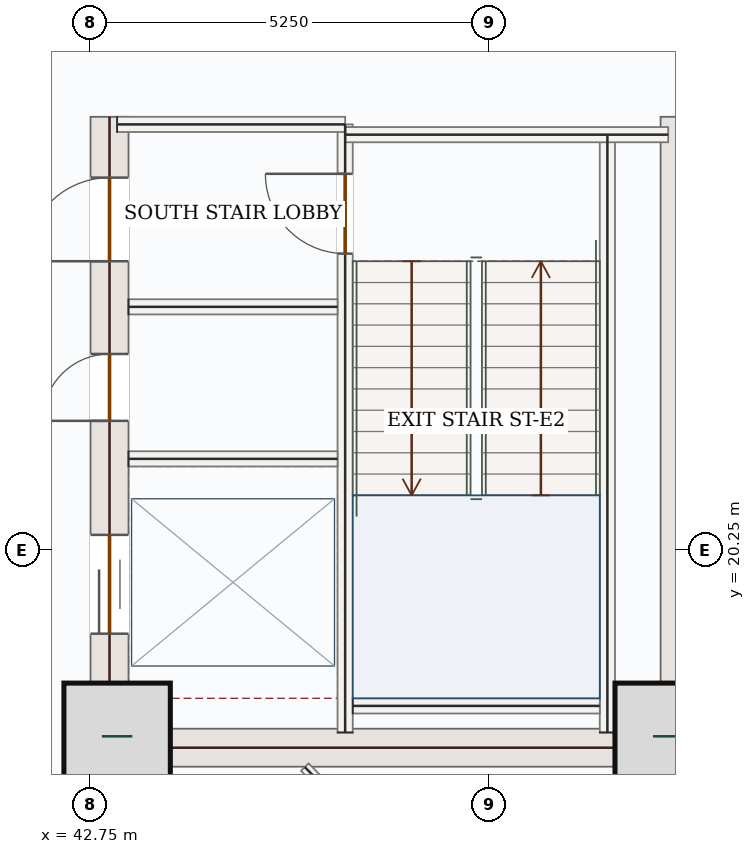
"""IFC4 building model, lengths in metres.
Left out: names, types, materials, properties, quantities, classifications, styles, units other than length and angle.
Written with IfcOpenShell. Run it as: python <this file> out.ifc"""

import sys

from ifc_helpers import new_model, si_unit, direction, frame, frame_2d, origin, origin_2d, place, context, subcontext, project, spatial, rectangle, extrude, source, transform, mapped, element, fill, save


model = new_model("IFC4")
c1 = context("Model", 3, precision=1e-05, world=origin(), true_north=direction((0.0, 1.0)))
c2 = subcontext(c1, "Body", "Model", "MODEL_VIEW")
j1 = project(units=[si_unit("LENGTHUNIT", "METRE"), si_unit("PLANEANGLEUNIT", "RADIAN")], contexts=[c1])
p1 = place(None, origin())
s1 = spatial("IfcSite", under=j1, at=p1, CompositionType="ELEMENT")
p2 = place(p1, origin())
s2 = spatial("IfcBuilding", under=s1, at=p2, CompositionType="ELEMENT")
p3 = place(p2, frame((0.0, 0.0, 37.5)))
s3 = spatial("IfcBuildingStorey", under=s2, at=p3, CompositionType="ELEMENT", Elevation=37.5)
p4 = place(p3, frame((43.0, 17.4, 0.0), z_axis=(0.0, 0.0, 1.0), x_axis=(0.0, 1.0, 0.0)))
e1 = element("IfcWall", 1, at=p4, inside=s3, PredefinedType="SHEAR", context=c2, shape_type="SweptSolid", body=[
    extrude(rectangle(XDim=8.55, YDim=0.5, at=frame_2d((4.275, 0.0))), origin(), (0.0, 0.0, 1.0), 3.95),
])
p5 = place(p4, frame((6.65, 0.0, 0.0)))
e2 = element("IfcOpeningElement", 2, at=p5, cuts=e1, PredefinedType="OPENING", context=c2, shape_type="SweptSolid", body=[
    extrude(rectangle(XDim=1.1, YDim=2.2, at=frame_2d((0.55, 1.1))), frame((0.0, 0.26, 0.0), z_axis=(0.0, -1.0, 0.0), x_axis=(1.0, 0.0, 0.0)), (0.0, 0.0, 1.0), 0.52),
])
p6 = place(p4, frame((1.75, 0.0, 0.0)))
e3 = element("IfcOpeningElement", 3, at=p6, cuts=e1, PredefinedType="OPENING", context=c2, shape_type="SweptSolid", body=[
    extrude(rectangle(XDim=1.3, YDim=2.2, at=frame_2d((0.65, 1.1))), frame((0.0, 0.26, 0.0), z_axis=(0.0, -1.0, 0.0), x_axis=(1.0, 0.0, 0.0)), (0.0, 0.0, 1.0), 0.52),
])
p7 = place(p4, frame((4.55, 0.0, 0.0)))
e4 = element("IfcOpeningElement", 4, at=p7, cuts=e1, PredefinedType="OPENING", context=c2, shape_type="SweptSolid", body=[
    extrude(rectangle(XDim=0.88, YDim=2.1, at=frame_2d((0.44, 1.05))), frame((0.0, 0.26, 0.0), z_axis=(0.0, -1.0, 0.0), x_axis=(1.0, 0.0, 0.0)), (0.0, 0.0, 1.0), 0.52),
])
m1 = source(origin(), c2, "Body", "SweptSolid", [
    extrude(rectangle(XDim=8.55, YDim=0.5, at=frame_2d((4.275, 0.0))), origin(), (0.0, 0.0, 1.0), 3.95),
])
p8 = place(p3, frame((50.5, 17.4, 0.0), z_axis=(0.0, 0.0, 1.0), x_axis=(0.0, 1.0, 0.0)))
e5 = element("IfcWall", 5, at=p8, inside=s3, PredefinedType="SHEAR", context=c2, shape_type="MappedRepresentation", body=[
    mapped(m1, transform((0.0, 0.0, 0.0), x_axis=(1.0, 0.0, 0.0), y_axis=(0.0, 1.0, 0.0), z_axis=(0.0, 0.0, 1.0), scale=1.0)),
])
m2 = source(origin(), c2, "Body", "SweptSolid", [
    extrude(rectangle(XDim=7.0, YDim=0.5, at=frame_2d((3.5, 0.0))), origin(), (0.0, 0.0, 1.0), 3.95),
])
p9 = place(p3, frame((43.25, 17.65, 0.0), z_axis=(0.0, 0.0, 1.0), x_axis=(1.0, 0.0, 0.0)))
e6 = element("IfcWall", 6, at=p9, inside=s3, PredefinedType="SHEAR", context=c2, shape_type="MappedRepresentation", body=[
    mapped(m2, transform((0.0, 0.0, 0.0), x_axis=(1.0, 0.0, 0.0), y_axis=(0.0, 1.0, 0.0), z_axis=(0.0, 0.0, 1.0), scale=1.0)),
])
m3 = source(origin(), c2, "Body", "SweptSolid", [
    extrude(rectangle(XDim=1.4, YDim=1.4, at=origin_2d()), origin(), (0.0, 0.0, 1.0), 4.2),
])
for number, where, z_axis, x_axis in (
    (7, (43.1, 17.8, 0.0), (0.0, 0.0, 1.0), (1.0, 0.0, 0.0)),
    (8, (50.35, 17.8, 0.0), (0.0, 0.0, 1.0), (1.0, 0.0, 0.0)),
):
    element("IfcColumn", number, at=place(p3, frame(where, z_axis=z_axis, x_axis=x_axis)), inside=s3, PredefinedType="COLUMN", context=c2, shape_type="MappedRepresentation", body=[
        mapped(m3, transform((0.0, 0.0, 0.0), x_axis=(1.0, 0.0, 0.0), y_axis=(0.0, 1.0, 0.0), z_axis=(0.0, 0.0, 1.0), scale=1.0)),
    ])
p10 = place(p3, frame((53.06, 18.458, 0.0), z_axis=(0.0, 0.0, 1.0), x_axis=(-0.707106781187, -0.707106781187, 0.0)))
e9 = element("IfcWall", 9, at=p10, inside=s3, PredefinedType="SOLIDWALL", context=c2, shape_type="SweptSolid", body=[
    extrude(rectangle(XDim=5.258, YDim=0.32, at=frame_2d((2.629, 0.0))), origin(), (0.0, 0.0, 1.0), 3.95),
])
p11 = place(p10, frame((1.429, 0.0, 0.85)))
e10 = element("IfcOpeningElement", 10, at=p11, cuts=e9, PredefinedType="OPENING", context=c2, shape_type="SweptSolid", body=[
    extrude(rectangle(XDim=2.4, YDim=1.8, at=frame_2d((1.2, 0.9))), frame((0.0, 0.17, 0.0), z_axis=(0.0, -1.0, 0.0), x_axis=(1.0, 0.0, 0.0)), (0.0, 0.0, 1.0), 0.34),
])
m4 = source(origin(), c2, "Body", "SweptSolid", [
    extrude(rectangle(XDim=7.87, YDim=0.2, at=frame_2d((3.935, 0.0))), origin(), (0.0, 0.0, 1.0), 3.95),
])
p12 = place(p3, frame((49.55, 17.85, 0.0), z_axis=(0.0, 0.0, 1.0), x_axis=(0.0, 1.0, 0.0)))
e11 = element("IfcWall", 11, at=p12, inside=s3, PredefinedType="SOLIDWALL", context=c2, shape_type="MappedRepresentation", body=[
    mapped(m4, transform((0.0, 0.0, 0.0), x_axis=(1.0, 0.0, 0.0), y_axis=(0.0, 1.0, 0.0), z_axis=(0.0, 0.0, 1.0), scale=1.0)),
])
p13 = place(p3, frame((46.1, 17.85, 0.0), z_axis=(0.0, 0.0, 1.0), x_axis=(0.0, 1.0, 0.0)))
e12 = element("IfcWall", 12, at=p13, inside=s3, PredefinedType="SOLIDWALL", context=c2, shape_type="SweptSolid", body=[
    extrude(rectangle(XDim=8.0, YDim=0.2, at=frame_2d((4.0, 0.0))), origin(), (0.0, 0.0, 1.0), 3.95),
])
p14 = place(p13, frame((6.3, 0.0, 0.0)))
e13 = element("IfcOpeningElement", 13, at=p14, cuts=e12, PredefinedType="OPENING", context=c2, shape_type="SweptSolid", body=[
    extrude(rectangle(XDim=1.05, YDim=2.15, at=frame_2d((0.525, 1.075))), frame((0.0, 0.11, 0.0), z_axis=(0.0, -1.0, 0.0), x_axis=(1.0, 0.0, 0.0)), (0.0, 0.0, 1.0), 0.22),
])
m5 = source(origin(), c2, "Body", "SweptSolid", [
    extrude(rectangle(XDim=3.0, YDim=0.2, at=frame_2d((1.5, 0.0))), origin(), (0.0, 0.0, 1.0), 3.95),
])
p15 = place(p3, frame((43.1, 25.85, 0.0), z_axis=(0.0, 0.0, 1.0), x_axis=(1.0, 0.0, 0.0)))
e14 = element("IfcWall", 14, at=p15, inside=s3, PredefinedType="SOLIDWALL", context=c2, shape_type="MappedRepresentation", body=[
    mapped(m5, transform((0.0, 0.0, 0.0), x_axis=(1.0, 0.0, 0.0), y_axis=(0.0, 1.0, 0.0), z_axis=(0.0, 0.0, 1.0), scale=1.0)),
])
m6 = source(origin(), c2, "Body", "SweptSolid", [
    extrude(rectangle(XDim=4.25, YDim=0.2, at=frame_2d((2.125, 0.0))), origin(), (0.0, 0.0, 1.0), 3.95),
])
p16 = place(p3, frame((46.1, 25.715, 0.0), z_axis=(0.0, 0.0, 1.0), x_axis=(1.0, 0.0, 0.0)))
e15 = element("IfcWall", 15, at=p16, inside=s3, PredefinedType="SOLIDWALL", context=c2, shape_type="MappedRepresentation", body=[
    mapped(m6, transform((0.0, 0.0, 0.0), x_axis=(1.0, 0.0, 0.0), y_axis=(0.0, 1.0, 0.0), z_axis=(0.0, 0.0, 1.0), scale=1.0)),
])
m7 = source(origin(), c2, "Body", "SweptSolid", [
    extrude(rectangle(XDim=3.25, YDim=0.2, at=frame_2d((1.625, 0.0))), origin(), (0.0, 0.0, 1.0), 3.95),
])
p17 = place(p3, frame((46.2, 18.2, 0.0), z_axis=(0.0, 0.0, 1.0), x_axis=(1.0, 0.0, 0.0)))
e16 = element("IfcWall", 16, at=p17, inside=s3, PredefinedType="SOLIDWALL", context=c2, shape_type="MappedRepresentation", body=[
    mapped(m7, transform((0.0, 0.0, 0.0), x_axis=(1.0, 0.0, 0.0), y_axis=(0.0, 1.0, 0.0), z_axis=(0.0, 0.0, 1.0), scale=1.0)),
])
m8 = source(origin(), c2, "Body", "SweptSolid", [
    extrude(rectangle(XDim=2.75, YDim=0.2, at=frame_2d((1.375, 0.0))), origin(), (0.0, 0.0, 1.0), 3.95),
])
for number, where, z_axis, x_axis in (
    (17, (43.25, 23.45, 0.0), (0.0, 0.0, 1.0), (1.0, 0.0, 0.0)),
    (18, (43.25, 21.45, 0.0), (0.0, 0.0, 1.0), (1.0, 0.0, 0.0)),
):
    element("IfcWall", number, at=place(p3, frame(where, z_axis=z_axis, x_axis=x_axis)), inside=s3, PredefinedType="SOLIDWALL", context=c2, shape_type="MappedRepresentation", body=[
        mapped(m8, transform((0.0, 0.0, 0.0), x_axis=(1.0, 0.0, 0.0), y_axis=(0.0, 1.0, 0.0), z_axis=(0.0, 0.0, 1.0), scale=1.0)),
    ])
m9 = source(origin(), c2, "Body", "SweptSolid", [
    extrude(rectangle(XDim=3.505, YDim=0.14, at=frame_2d((1.752, 0.0))), origin(), (0.0, 0.0, 1.0), 3.95),
])
p18 = place(p3, frame((48.036, 14.905, 0.0), z_axis=(0.0, 0.0, 1.0), x_axis=(-0.703790445361, 0.710407635811, 0.0)))
e19 = element("IfcWall", 19, at=p18, inside=s3, PredefinedType="PARTITIONING", context=c2, shape_type="MappedRepresentation", body=[
    mapped(m9, transform((0.0, 0.0, 0.0), x_axis=(1.0, 0.0, 0.0), y_axis=(0.0, 1.0, 0.0), z_axis=(0.0, 0.0, 1.0), scale=1.0)),
])
m10 = source(origin(), c2, "Body", "SweptSolid", [
    extrude(rectangle(XDim=2.4, YDim=1.8, at=frame_2d((1.2, 0.9))), frame((0.0, 0.03, 0.0), z_axis=(0.0, -1.0, 0.0), x_axis=(1.0, 0.0, 0.0)), (0.0, 0.0, 1.0), 0.06),
])
p19 = place(p11, origin())
e20 = element("IfcWindow", 20, at=p19, inside=s3, PartitioningType="DOUBLE_PANEL_VERTICAL", PredefinedType="WINDOW", context=c2, shape_type="MappedRepresentation", body=[
    mapped(m10, transform((0.0, 0.0, 0.0), x_axis=(1.0, 0.0, 0.0), y_axis=(0.0, 1.0, 0.0), z_axis=(0.0, 0.0, 1.0), scale=1.0)),
])
fill(e10, e20)
m11 = source(origin(), c2, "Body", "SweptSolid", [
    extrude(rectangle(XDim=1.05, YDim=2.15, at=frame_2d((0.525, 1.075))), frame((0.0, 0.025, 0.0), z_axis=(0.0, -1.0, 0.0), x_axis=(1.0, 0.0, 0.0)), (0.0, 0.0, 1.0), 0.05),
])
p20 = place(p14, origin())
e21 = element("IfcDoor", 21, at=p20, inside=s3, OperationType="SINGLE_SWING_RIGHT", PredefinedType="DOOR", context=c2, shape_type="MappedRepresentation", body=[
    mapped(m11, transform((0.0, 0.0, 0.0), x_axis=(1.0, 0.0, 0.0), y_axis=(0.0, 1.0, 0.0), z_axis=(0.0, 0.0, 1.0), scale=1.0)),
])
fill(e13, e21)
m12 = source(origin(), c2, "Body", "SweptSolid", [
    extrude(rectangle(XDim=1.1, YDim=2.2, at=frame_2d((0.55, 1.1))), frame((0.0, 0.025, 0.0), z_axis=(0.0, -1.0, 0.0), x_axis=(1.0, 0.0, 0.0)), (0.0, 0.0, 1.0), 0.05),
])
p21 = place(p5, origin())
e22 = element("IfcDoor", 22, at=p21, inside=s3, OperationType="SINGLE_SWING_LEFT", PredefinedType="DOOR", context=c2, shape_type="MappedRepresentation", body=[
    mapped(m12, transform((0.0, 0.0, 0.0), x_axis=(1.0, 0.0, 0.0), y_axis=(0.0, 1.0, 0.0), z_axis=(0.0, 0.0, 1.0), scale=1.0)),
])
fill(e2, e22)
m13 = source(origin(), c2, "Body", "SweptSolid", [
    extrude(rectangle(XDim=1.3, YDim=2.2, at=frame_2d((0.65, 1.1))), frame((0.0, 0.025, 0.0), z_axis=(0.0, -1.0, 0.0), x_axis=(1.0, 0.0, 0.0)), (0.0, 0.0, 1.0), 0.05),
])
p22 = place(p6, origin())
e23 = element("IfcDoor", 23, at=p22, inside=s3, OperationType="DOUBLE_DOOR_SLIDING", PredefinedType="DOOR", context=c2, shape_type="MappedRepresentation", body=[
    mapped(m13, transform((0.0, 0.0, 0.0), x_axis=(1.0, 0.0, 0.0), y_axis=(0.0, 1.0, 0.0), z_axis=(0.0, 0.0, 1.0), scale=1.0)),
])
fill(e3, e23)
m14 = source(origin(), c2, "Body", "SweptSolid", [
    extrude(rectangle(XDim=0.88, YDim=2.1, at=frame_2d((0.44, 1.05))), frame((0.0, 0.025, 0.0), z_axis=(0.0, -1.0, 0.0), x_axis=(1.0, 0.0, 0.0)), (0.0, 0.0, 1.0), 0.05),
])
p23 = place(p7, origin())
e24 = element("IfcDoor", 24, at=p23, inside=s3, OperationType="SINGLE_SWING_LEFT", PredefinedType="DOOR", context=c2, shape_type="MappedRepresentation", body=[
    mapped(m14, transform((0.0, 0.0, 0.0), x_axis=(1.0, 0.0, 0.0), y_axis=(0.0, 1.0, 0.0), z_axis=(0.0, 0.0, 1.0), scale=1.0)),
])
fill(e4, e24)
save(model, sys.argv[1])
